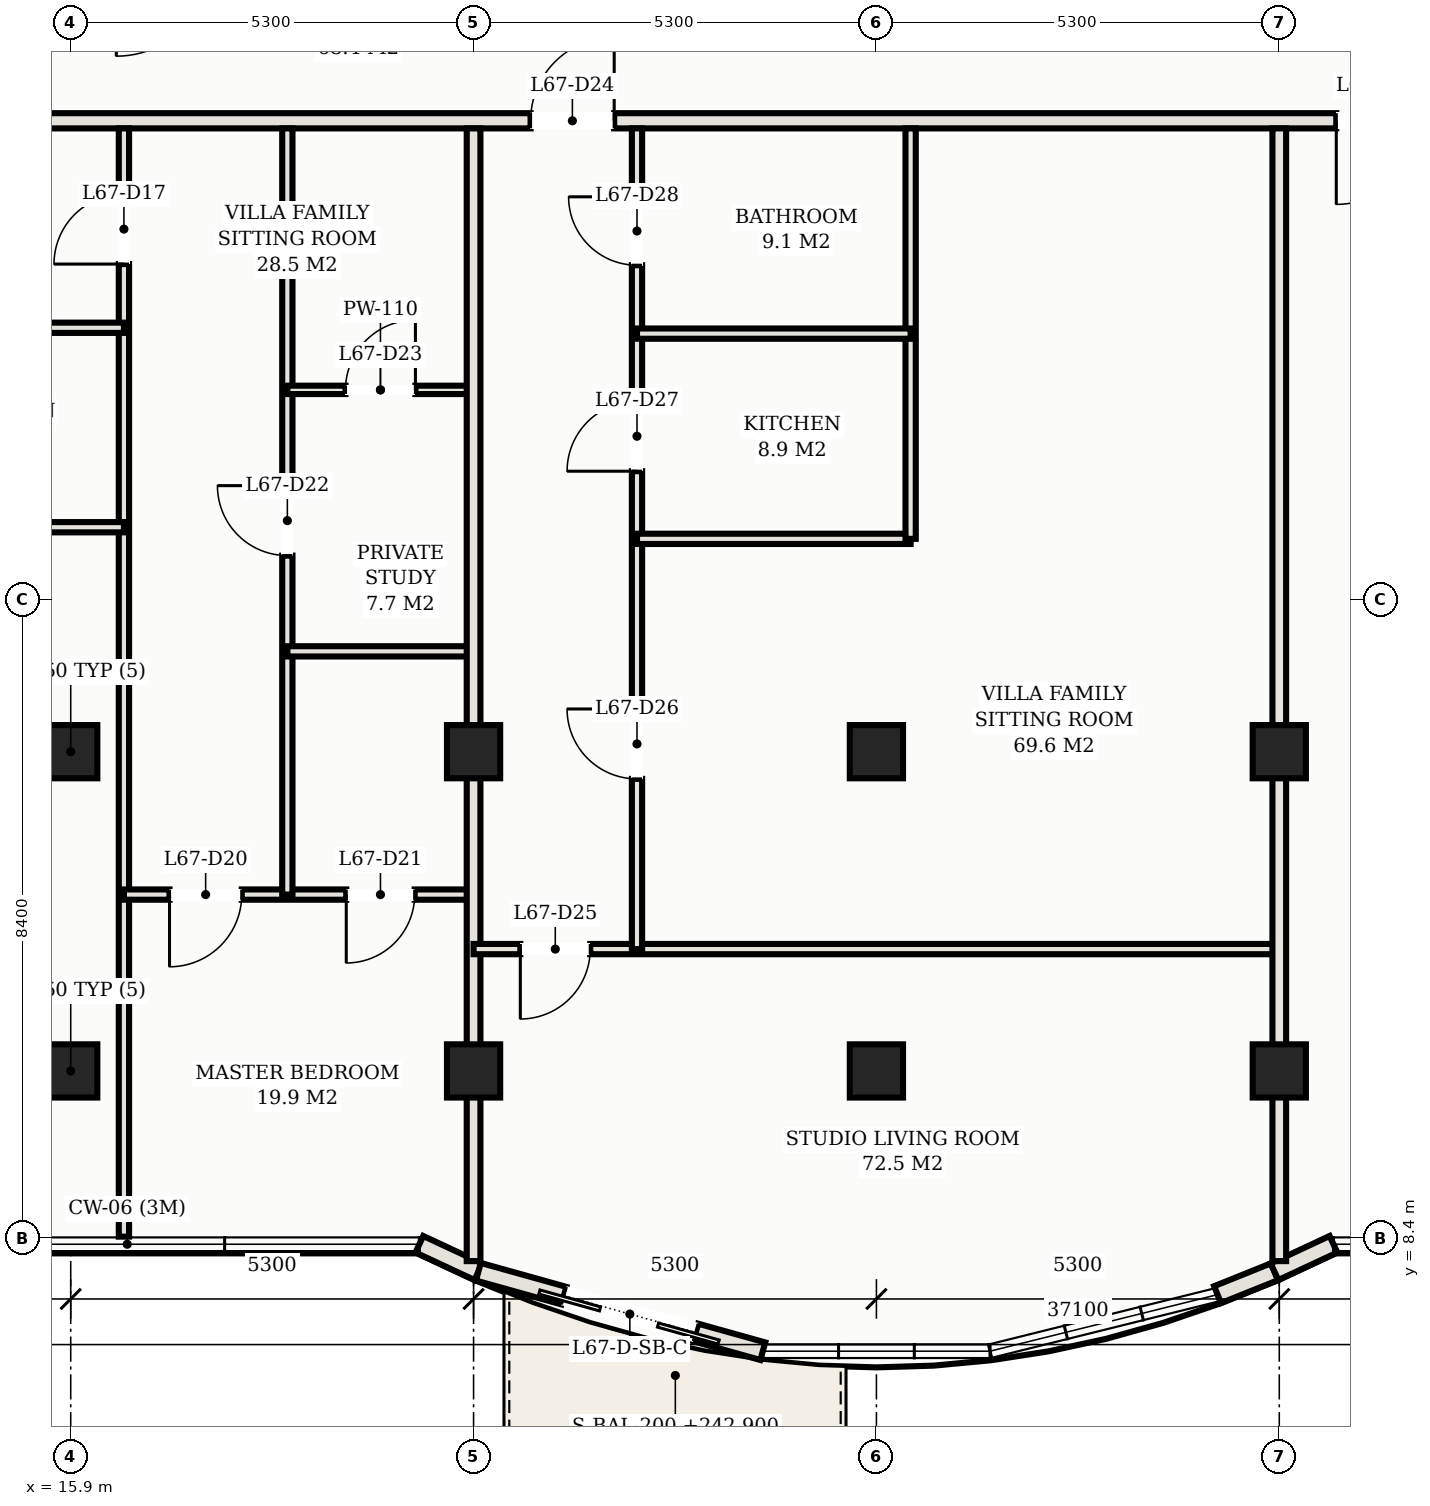
"""IFC4 building model, lengths in metres.
Left out: names, types, materials, properties, quantities, classifications, styles, units other than length and angle.
Written with IfcOpenShell. Run it as: python <this file> out.ifc"""

import sys

from ifc_helpers import new_model, si_unit, direction, frame, frame_2d, origin, origin_2d, place, context, subcontext, project, spatial, rectangle, hollow_rectangle, extrude, element, fill, save


model = new_model("IFC4")
c1 = context("Model", 3, precision=1e-05, world=origin(), true_north=direction((0.0, 1.0)))
c2 = subcontext(c1, "Body", "Model", "MODEL_VIEW")
j1 = project(units=[si_unit("LENGTHUNIT", "METRE"), si_unit("PLANEANGLEUNIT", "RADIAN")], contexts=[c1])
p1 = place(None, origin())
s1 = spatial("IfcSite", under=j1, at=p1, CompositionType="ELEMENT")
p2 = place(p1, origin())
s2 = spatial("IfcBuilding", under=s1, at=p2, CompositionType="ELEMENT")
p3 = place(p2, frame((0.0, 0.0, 242.9)))
s3 = spatial("IfcBuildingStorey", under=s2, at=p3, CompositionType="ELEMENT", Elevation=242.9)
for number, where, z_axis, x_axis in (
    (1, (15.9, 14.8, 0.0), (0.0, 0.0, 1.0), (1.0, 0.0, 0.0)),
    (2, (15.9, 10.6, 0.0), (0.0, 0.0, 1.0), (1.0, 0.0, 0.0)),
    (3, (21.2, 14.8, 0.0), (0.0, 0.0, 1.0), (1.0, 0.0, 0.0)),
    (4, (21.2, 10.6, 0.0), (0.0, 0.0, 1.0), (1.0, 0.0, 0.0)),
    (5, (26.5, 14.8, 0.0), (0.0, 0.0, 1.0), (1.0, 0.0, 0.0)),
    (6, (26.5, 10.6, 0.0), (0.0, 0.0, 1.0), (1.0, 0.0, 0.0)),
    (7, (31.8, 14.8, 0.0), (0.0, 0.0, 1.0), (1.0, 0.0, 0.0)),
    (8, (31.8, 10.6, 0.0), (0.0, 0.0, 1.0), (1.0, 0.0, 0.0)),
):
    element("IfcColumn", number, at=place(p3, frame(where, z_axis=z_axis, x_axis=x_axis)), inside=s3, PredefinedType="COLUMN", context=c2, shape_type="SweptSolid", body=[
        extrude(hollow_rectangle(XDim=0.7, YDim=0.7, WallThickness=0.025, at=origin_2d()), origin(), (0.0, 0.0, 1.0), 3.3),
    ])
p4 = place(p3, frame((20.487, 8.32, 0.0), z_axis=(0.0, 0.0, 1.0), x_axis=(0.906190424584, -0.422869855147, 0.0)))
e9 = element("IfcWall", 9, at=p4, inside=s3, PredefinedType="SOLIDWALL", context=c2, shape_type="SweptSolid", body=[
    extrude(rectangle(XDim=0.856, YDim=0.24, at=frame_2d((0.428, 0.0))), origin(), (0.0, 0.0, 1.0), 3.11),
])
p5 = place(p3, frame((21.263, 7.958, 0.0), z_axis=(0.0, 0.0, 1.0), x_axis=(0.963152398068, -0.268956238255, 0.0)))
e10 = element("IfcWall", 10, at=p5, inside=s3, PredefinedType="SOLIDWALL", context=c2, shape_type="SweptSolid", body=[
    extrude(rectangle(XDim=3.885, YDim=0.24, at=frame_2d((1.942, 0.0))), origin(), (0.0, 0.0, 1.0), 3.11),
])
p6 = place(p5, frame((1.169, 0.0, 0.0)))
e11 = element("IfcOpeningElement", 11, at=p6, cuts=e10, PredefinedType="OPENING", context=c2, shape_type="SweptSolid", body=[
    extrude(rectangle(XDim=1.8, YDim=2.2, at=frame_2d((0.9, 1.1))), frame((0.0, 0.13, 0.0), z_axis=(0.0, -1.0, 0.0), x_axis=(1.0, 0.0, 0.0)), (0.0, 0.0, 1.0), 0.26),
])
p7 = place(p3, frame((30.988, 7.657, 0.0), z_axis=(0.0, 0.0, 1.0), x_axis=(0.927870589467, 0.372902358805, 0.0)))
e12 = element("IfcWall", 12, at=p7, inside=s3, PredefinedType="SOLIDWALL", context=c2, shape_type="SweptSolid", body=[
    extrude(rectangle(XDim=0.807, YDim=0.24, at=frame_2d((0.404, 0.0))), origin(), (0.0, 0.0, 1.0), 3.11),
])
p8 = place(p3, frame((31.737, 7.958, 0.0), z_axis=(0.0, 0.0, 1.0), x_axis=(0.906190424584, 0.422869855147, 0.0)))
e13 = element("IfcWall", 13, at=p8, inside=s3, PredefinedType="SOLIDWALL", context=c2, shape_type="SweptSolid", body=[
    extrude(rectangle(XDim=0.856, YDim=0.24, at=frame_2d((0.428, 0.0))), origin(), (0.0, 0.0, 1.0), 3.11),
])
p9 = place(p3, frame((8.6, 23.1, 0.0), z_axis=(0.0, 0.0, 1.0), x_axis=(1.0, 0.0, 0.0)))
e14 = element("IfcWall", 14, at=p9, inside=s3, PredefinedType="PARTITIONING", context=c2, shape_type="SweptSolid", body=[
    extrude(rectangle(XDim=35.8, YDim=0.2, at=frame_2d((17.9, 0.0))), origin(), (0.0, 0.0, 1.0), 2.45),
])
p10 = place(p9, frame((2.75, 0.0, 0.0)))
e15 = element("IfcOpeningElement", 15, at=p10, cuts=e14, PredefinedType="OPENING", context=c2, shape_type="SweptSolid", body=[
    extrude(rectangle(XDim=1.1, YDim=2.25, at=frame_2d((0.55, 1.125))), frame((0.0, 0.11, 0.0), z_axis=(0.0, -1.0, 0.0), x_axis=(1.0, 0.0, 0.0)), (0.0, 0.0, 1.0), 0.22),
])
p11 = place(p9, frame((13.35, 0.0, 0.0)))
e16 = element("IfcOpeningElement", 16, at=p11, cuts=e14, PredefinedType="OPENING", context=c2, shape_type="SweptSolid", body=[
    extrude(rectangle(XDim=1.1, YDim=2.25, at=frame_2d((0.55, 1.125))), frame((0.0, 0.11, 0.0), z_axis=(0.0, -1.0, 0.0), x_axis=(1.0, 0.0, 0.0)), (0.0, 0.0, 1.0), 0.22),
])
p12 = place(p9, frame((23.95, 0.0, 0.0)))
e17 = element("IfcOpeningElement", 17, at=p12, cuts=e14, PredefinedType="OPENING", context=c2, shape_type="SweptSolid", body=[
    extrude(rectangle(XDim=1.1, YDim=2.25, at=frame_2d((0.55, 1.125))), frame((0.0, 0.11, 0.0), z_axis=(0.0, -1.0, 0.0), x_axis=(1.0, 0.0, 0.0)), (0.0, 0.0, 1.0), 0.22),
])
p13 = place(p9, frame((29.25, 0.0, 0.0)))
e18 = element("IfcOpeningElement", 18, at=p13, cuts=e14, PredefinedType="OPENING", context=c2, shape_type="SweptSolid", body=[
    extrude(rectangle(XDim=1.1, YDim=2.25, at=frame_2d((0.55, 1.125))), frame((0.0, 0.11, 0.0), z_axis=(0.0, -1.0, 0.0), x_axis=(1.0, 0.0, 0.0)), (0.0, 0.0, 1.0), 0.22),
])
p14 = place(p9, frame((0.505, 0.0, 0.0)))
e19 = element("IfcOpeningElement", 19, at=p14, cuts=e14, PredefinedType="OPENING", context=c2, shape_type="SweptSolid", body=[
    extrude(rectangle(XDim=0.9, YDim=2.15, at=frame_2d((0.45, 1.075))), frame((0.0, 0.11, 0.0), z_axis=(0.0, -1.0, 0.0), x_axis=(1.0, 0.0, 0.0)), (0.0, 0.0, 1.0), 0.22),
])
p15 = place(p9, frame((34.395, 0.0, 0.0)))
e20 = element("IfcOpeningElement", 20, at=p15, cuts=e14, PredefinedType="OPENING", context=c2, shape_type="SweptSolid", body=[
    extrude(rectangle(XDim=0.9, YDim=2.15, at=frame_2d((0.45, 1.075))), frame((0.0, 0.11, 0.0), z_axis=(0.0, -1.0, 0.0), x_axis=(1.0, 0.0, 0.0)), (0.0, 0.0, 1.0), 0.22),
])
p16 = place(p3, frame((16.6, 8.42, 0.0), z_axis=(0.0, 0.0, 1.0), x_axis=(0.0, 1.0, 0.0)))
e21 = element("IfcWall", 21, at=p16, inside=s3, PredefinedType="PARTITIONING", context=c2, shape_type="SweptSolid", body=[
    extrude(rectangle(XDim=14.58, YDim=0.135, at=frame_2d((7.29, 0.0))), origin(), (0.0, 0.0, 1.0), 2.45),
])
p17 = place(p16, frame((12.795, 0.0, 0.0)))
e22 = element("IfcOpeningElement", 22, at=p17, cuts=e21, PredefinedType="OPENING", context=c2, shape_type="SweptSolid", body=[
    extrude(rectangle(XDim=0.92, YDim=2.15, at=frame_2d((0.46, 1.075))), frame((0.0, 0.078, 0.0), z_axis=(0.0, -1.0, 0.0), x_axis=(1.0, 0.0, 0.0)), (0.0, 0.0, 1.0), 0.155),
])
for number, where, z_axis, x_axis in (
    (23, (12.75, 17.753, 0.0), (0.0, 0.0, 1.0), (1.0, 0.0, 0.0)),
    (24, (12.75, 20.377, 0.0), (0.0, 0.0, 1.0), (1.0, 0.0, 0.0)),
):
    element("IfcWall", number, at=place(p3, frame(where, z_axis=z_axis, x_axis=x_axis)), inside=s3, PredefinedType="PARTITIONING", context=c2, shape_type="SweptSolid", body=[
        extrude(rectangle(XDim=3.85, YDim=0.135, at=frame_2d((1.925, 0.0))), origin(), (0.0, 0.0, 1.0), 2.45),
    ])
p18 = place(p3, frame((16.6, 12.92, 0.0), z_axis=(0.0, 0.0, 1.0), x_axis=(1.0, 0.0, 0.0)))
e25 = element("IfcWall", 25, at=p18, inside=s3, PredefinedType="PARTITIONING", context=c2, shape_type="SweptSolid", body=[
    extrude(rectangle(XDim=4.6, YDim=0.135, at=frame_2d((2.3, 0.0))), origin(), (0.0, 0.0, 1.0), 2.45),
])
p19 = place(p18, frame((0.6, 0.0, 0.0)))
e26 = element("IfcOpeningElement", 26, at=p19, cuts=e25, PredefinedType="OPENING", context=c2, shape_type="SweptSolid", body=[
    extrude(rectangle(XDim=0.95, YDim=2.15, at=frame_2d((0.475, 1.075))), frame((0.0, 0.078, 0.0), z_axis=(0.0, -1.0, 0.0), x_axis=(1.0, 0.0, 0.0)), (0.0, 0.0, 1.0), 0.155),
])
p20 = place(p18, frame((2.925, 0.0, 0.0)))
e27 = element("IfcOpeningElement", 27, at=p20, cuts=e25, PredefinedType="OPENING", context=c2, shape_type="SweptSolid", body=[
    extrude(rectangle(XDim=0.9, YDim=2.15, at=frame_2d((0.45, 1.075))), frame((0.0, 0.078, 0.0), z_axis=(0.0, -1.0, 0.0), x_axis=(1.0, 0.0, 0.0)), (0.0, 0.0, 1.0), 0.155),
])
p21 = place(p3, frame((18.75, 12.92, 0.0), z_axis=(0.0, 0.0, 1.0), x_axis=(0.0, 1.0, 0.0)))
e28 = element("IfcWall", 28, at=p21, inside=s3, PredefinedType="PARTITIONING", context=c2, shape_type="SweptSolid", body=[
    extrude(rectangle(XDim=10.08, YDim=0.135, at=frame_2d((5.04, 0.0))), origin(), (0.0, 0.0, 1.0), 2.45),
])
p22 = place(p21, frame((4.46, 0.0, 0.0)))
e29 = element("IfcOpeningElement", 29, at=p22, cuts=e28, PredefinedType="OPENING", context=c2, shape_type="SweptSolid", body=[
    extrude(rectangle(XDim=0.92, YDim=2.15, at=frame_2d((0.46, 1.075))), frame((0.0, 0.078, 0.0), z_axis=(0.0, -1.0, 0.0), x_axis=(1.0, 0.0, 0.0)), (0.0, 0.0, 1.0), 0.155),
])
p23 = place(p3, frame((18.75, 16.12, 0.0), z_axis=(0.0, 0.0, 1.0), x_axis=(1.0, 0.0, 0.0)))
e30 = element("IfcWall", 30, at=p23, inside=s3, PredefinedType="PARTITIONING", context=c2, shape_type="SweptSolid", body=[
    extrude(rectangle(XDim=2.45, YDim=0.135, at=frame_2d((1.225, 0.0))), origin(), (0.0, 0.0, 1.0), 2.45),
])
p24 = place(p3, frame((18.75, 19.56, 0.0), z_axis=(0.0, 0.0, 1.0), x_axis=(1.0, 0.0, 0.0)))
e31 = element("IfcWall", 31, at=p24, inside=s3, PredefinedType="MOVABLE", context=c2, shape_type="SweptSolid", body=[
    extrude(rectangle(XDim=2.45, YDim=0.11, at=frame_2d((1.225, 0.0))), origin(), (0.0, 0.0, 1.0), 2.45),
])
p25 = place(p24, frame((0.765, 0.0, 0.0)))
e32 = element("IfcOpeningElement", 32, at=p25, cuts=e31, PredefinedType="OPENING", context=c2, shape_type="SweptSolid", body=[
    extrude(rectangle(XDim=0.92, YDim=2.15, at=frame_2d((0.46, 1.075))), frame((0.0, 0.065, 0.0), z_axis=(0.0, -1.0, 0.0), x_axis=(1.0, 0.0, 0.0)), (0.0, 0.0, 1.0), 0.13),
])
p26 = place(p3, frame((21.2, 8.098, 0.0), z_axis=(0.0, 0.0, 1.0), x_axis=(0.0, 1.0, 0.0)))
e33 = element("IfcWall", 33, at=p26, inside=s3, PredefinedType="PARTITIONING", context=c2, shape_type="SweptSolid", body=[
    extrude(rectangle(XDim=14.902, YDim=0.18, at=frame_2d((7.451, 0.0))), origin(), (0.0, 0.0, 1.0), 2.45),
])
p27 = place(p3, frame((21.2, 12.203, 0.0), z_axis=(0.0, 0.0, 1.0), x_axis=(1.0, 0.0, 0.0)))
e34 = element("IfcWall", 34, at=p27, inside=s3, PredefinedType="PARTITIONING", context=c2, shape_type="SweptSolid", body=[
    extrude(rectangle(XDim=10.6, YDim=0.135, at=frame_2d((5.3, 0.0))), origin(), (0.0, 0.0, 1.0), 2.45),
])
p28 = place(p27, frame((0.615, 0.0, 0.0)))
e35 = element("IfcOpeningElement", 35, at=p28, cuts=e34, PredefinedType="OPENING", context=c2, shape_type="SweptSolid", body=[
    extrude(rectangle(XDim=0.92, YDim=2.15, at=frame_2d((0.46, 1.075))), frame((0.0, 0.078, 0.0), z_axis=(0.0, -1.0, 0.0), x_axis=(1.0, 0.0, 0.0)), (0.0, 0.0, 1.0), 0.155),
])
p29 = place(p3, frame((23.35, 12.203, 0.0), z_axis=(0.0, 0.0, 1.0), x_axis=(0.0, 1.0, 0.0)))
e36 = element("IfcWall", 36, at=p29, inside=s3, PredefinedType="PARTITIONING", context=c2, shape_type="SweptSolid", body=[
    extrude(rectangle(XDim=10.797, YDim=0.135, at=frame_2d((5.398, 0.0))), origin(), (0.0, 0.0, 1.0), 2.45),
])
p30 = place(p29, frame((2.239, 0.0, 0.0)))
e37 = element("IfcOpeningElement", 37, at=p30, cuts=e36, PredefinedType="OPENING", context=c2, shape_type="SweptSolid", body=[
    extrude(rectangle(XDim=0.92, YDim=2.15, at=frame_2d((0.46, 1.075))), frame((0.0, 0.078, 0.0), z_axis=(0.0, -1.0, 0.0), x_axis=(1.0, 0.0, 0.0)), (0.0, 0.0, 1.0), 0.155),
])
p31 = place(p29, frame((6.287, 0.0, 0.0)))
e38 = element("IfcOpeningElement", 38, at=p31, cuts=e36, PredefinedType="OPENING", context=c2, shape_type="SweptSolid", body=[
    extrude(rectangle(XDim=0.92, YDim=2.15, at=frame_2d((0.46, 1.075))), frame((0.0, 0.078, 0.0), z_axis=(0.0, -1.0, 0.0), x_axis=(1.0, 0.0, 0.0)), (0.0, 0.0, 1.0), 0.155),
])
p32 = place(p29, frame((8.997, 0.0, 0.0)))
e39 = element("IfcOpeningElement", 39, at=p32, cuts=e36, PredefinedType="OPENING", context=c2, shape_type="SweptSolid", body=[
    extrude(rectangle(XDim=0.9, YDim=2.15, at=frame_2d((0.45, 1.075))), frame((0.0, 0.078, 0.0), z_axis=(0.0, -1.0, 0.0), x_axis=(1.0, 0.0, 0.0)), (0.0, 0.0, 1.0), 0.155),
])
p33 = place(p3, frame((23.35, 17.6, 0.0), z_axis=(0.0, 0.0, 1.0), x_axis=(1.0, 0.0, 0.0)))
e40 = element("IfcWall", 40, at=p33, inside=s3, PredefinedType="PARTITIONING", context=c2, shape_type="SweptSolid", body=[
    extrude(rectangle(XDim=3.6, YDim=0.135, at=frame_2d((1.8, 0.0))), origin(), (0.0, 0.0, 1.0), 2.45),
])
p34 = place(p3, frame((26.95, 17.6, 0.0), z_axis=(0.0, 0.0, 1.0), x_axis=(0.0, 1.0, 0.0)))
e41 = element("IfcWall", 41, at=p34, inside=s3, PredefinedType="PARTITIONING", context=c2, shape_type="SweptSolid", body=[
    extrude(rectangle(XDim=5.4, YDim=0.135, at=frame_2d((2.7, 0.0))), origin(), (0.0, 0.0, 1.0), 2.45),
])
p35 = place(p3, frame((23.35, 20.3, 0.0), z_axis=(0.0, 0.0, 1.0), x_axis=(1.0, 0.0, 0.0)))
e42 = element("IfcWall", 42, at=p35, inside=s3, PredefinedType="PARTITIONING", context=c2, shape_type="SweptSolid", body=[
    extrude(rectangle(XDim=3.6, YDim=0.135, at=frame_2d((1.8, 0.0))), origin(), (0.0, 0.0, 1.0), 2.45),
])
p36 = place(p3, frame((31.8, 8.098, 0.0), z_axis=(0.0, 0.0, 1.0), x_axis=(0.0, 1.0, 0.0)))
e43 = element("IfcWall", 43, at=p36, inside=s3, PredefinedType="PARTITIONING", context=c2, shape_type="SweptSolid", body=[
    extrude(rectangle(XDim=14.902, YDim=0.18, at=frame_2d((7.451, 0.0))), origin(), (0.0, 0.0, 1.0), 2.45),
])
p37 = place(p6, frame((1.8, 0.0, 0.0), z_axis=(0.0, 0.0, 1.0), x_axis=(-1.0, 0.0, 0.0)))
e44 = element("IfcDoor", 44, at=p37, inside=s3, OperationType="DOUBLE_DOOR_SLIDING", PredefinedType="DOOR", context=c2, shape_type="SweptSolid", body=[
    extrude(rectangle(XDim=1.8, YDim=2.2, at=frame_2d((0.9, 1.1))), frame((0.0, 0.025, 0.0), z_axis=(0.0, -1.0, 0.0), x_axis=(1.0, 0.0, 0.0)), (0.0, 0.0, 1.0), 0.05),
])
fill(e11, e44)
p38 = place(p17, origin())
e45 = element("IfcDoor", 45, at=p38, inside=s3, OperationType="SINGLE_SWING_LEFT", PredefinedType="DOOR", context=c2, shape_type="SweptSolid", body=[
    extrude(rectangle(XDim=0.92, YDim=2.15, at=frame_2d((0.46, 1.075))), frame((0.0, 0.025, 0.0), z_axis=(0.0, -1.0, 0.0), x_axis=(1.0, 0.0, 0.0)), (0.0, 0.0, 1.0), 0.05),
])
fill(e22, e45)
p39 = place(p19, frame((0.95, 0.0, 0.0), z_axis=(0.0, 0.0, 1.0), x_axis=(-1.0, 0.0, 0.0)))
e46 = element("IfcDoor", 46, at=p39, inside=s3, OperationType="SINGLE_SWING_RIGHT", PredefinedType="DOOR", context=c2, shape_type="SweptSolid", body=[
    extrude(rectangle(XDim=0.95, YDim=2.15, at=frame_2d((0.475, 1.075))), frame((0.0, 0.025, 0.0), z_axis=(0.0, -1.0, 0.0), x_axis=(1.0, 0.0, 0.0)), (0.0, 0.0, 1.0), 0.05),
])
fill(e26, e46)
p40 = place(p20, frame((0.9, 0.0, 0.0), z_axis=(0.0, 0.0, 1.0), x_axis=(-1.0, 0.0, 0.0)))
e47 = element("IfcDoor", 47, at=p40, inside=s3, OperationType="SINGLE_SWING_RIGHT", PredefinedType="DOOR", context=c2, shape_type="SweptSolid", body=[
    extrude(rectangle(XDim=0.9, YDim=2.15, at=frame_2d((0.45, 1.075))), frame((0.0, 0.025, 0.0), z_axis=(0.0, -1.0, 0.0), x_axis=(1.0, 0.0, 0.0)), (0.0, 0.0, 1.0), 0.05),
])
fill(e27, e47)
p41 = place(p22, origin())
e48 = element("IfcDoor", 48, at=p41, inside=s3, OperationType="SINGLE_SWING_RIGHT", PredefinedType="DOOR", context=c2, shape_type="SweptSolid", body=[
    extrude(rectangle(XDim=0.92, YDim=2.15, at=frame_2d((0.46, 1.075))), frame((0.0, 0.025, 0.0), z_axis=(0.0, -1.0, 0.0), x_axis=(1.0, 0.0, 0.0)), (0.0, 0.0, 1.0), 0.05),
])
fill(e29, e48)
p42 = place(p25, origin())
e49 = element("IfcDoor", 49, at=p42, inside=s3, OperationType="SINGLE_SWING_RIGHT", PredefinedType="DOOR", context=c2, shape_type="SweptSolid", body=[
    extrude(rectangle(XDim=0.92, YDim=2.15, at=frame_2d((0.46, 1.075))), frame((0.0, 0.025, 0.0), z_axis=(0.0, -1.0, 0.0), x_axis=(1.0, 0.0, 0.0)), (0.0, 0.0, 1.0), 0.05),
])
fill(e32, e49)
p43 = place(p11, origin())
e50 = element("IfcDoor", 50, at=p43, inside=s3, OperationType="SINGLE_SWING_RIGHT", PredefinedType="DOOR", context=c2, shape_type="SweptSolid", body=[
    extrude(rectangle(XDim=1.1, YDim=2.25, at=frame_2d((0.55, 1.125))), frame((0.0, 0.025, 0.0), z_axis=(0.0, -1.0, 0.0), x_axis=(1.0, 0.0, 0.0)), (0.0, 0.0, 1.0), 0.05),
])
fill(e16, e50)
p44 = place(p28, frame((0.92, 0.0, 0.0), z_axis=(0.0, 0.0, 1.0), x_axis=(-1.0, 0.0, 0.0)))
e51 = element("IfcDoor", 51, at=p44, inside=s3, OperationType="SINGLE_SWING_RIGHT", PredefinedType="DOOR", context=c2, shape_type="SweptSolid", body=[
    extrude(rectangle(XDim=0.92, YDim=2.15, at=frame_2d((0.46, 1.075))), frame((0.0, 0.025, 0.0), z_axis=(0.0, -1.0, 0.0), x_axis=(1.0, 0.0, 0.0)), (0.0, 0.0, 1.0), 0.05),
])
fill(e35, e51)
p45 = place(p30, origin())
e52 = element("IfcDoor", 52, at=p45, inside=s3, OperationType="SINGLE_SWING_RIGHT", PredefinedType="DOOR", context=c2, shape_type="SweptSolid", body=[
    extrude(rectangle(XDim=0.92, YDim=2.15, at=frame_2d((0.46, 1.075))), frame((0.0, 0.025, 0.0), z_axis=(0.0, -1.0, 0.0), x_axis=(1.0, 0.0, 0.0)), (0.0, 0.0, 1.0), 0.05),
])
fill(e37, e52)
p46 = place(p31, origin())
e53 = element("IfcDoor", 53, at=p46, inside=s3, OperationType="SINGLE_SWING_LEFT", PredefinedType="DOOR", context=c2, shape_type="SweptSolid", body=[
    extrude(rectangle(XDim=0.92, YDim=2.15, at=frame_2d((0.46, 1.075))), frame((0.0, 0.025, 0.0), z_axis=(0.0, -1.0, 0.0), x_axis=(1.0, 0.0, 0.0)), (0.0, 0.0, 1.0), 0.05),
])
fill(e38, e53)
p47 = place(p32, origin())
e54 = element("IfcDoor", 54, at=p47, inside=s3, OperationType="SINGLE_SWING_RIGHT", PredefinedType="DOOR", context=c2, shape_type="SweptSolid", body=[
    extrude(rectangle(XDim=0.9, YDim=2.15, at=frame_2d((0.45, 1.075))), frame((0.0, 0.025, 0.0), z_axis=(0.0, -1.0, 0.0), x_axis=(1.0, 0.0, 0.0)), (0.0, 0.0, 1.0), 0.05),
])
fill(e39, e54)
p48 = place(p12, frame((1.1, 0.0, 0.0), z_axis=(0.0, 0.0, 1.0), x_axis=(-1.0, 0.0, 0.0)))
e55 = element("IfcDoor", 55, at=p48, inside=s3, OperationType="SINGLE_SWING_RIGHT", PredefinedType="DOOR", context=c2, shape_type="SweptSolid", body=[
    extrude(rectangle(XDim=1.1, YDim=2.25, at=frame_2d((0.55, 1.125))), frame((0.0, 0.025, 0.0), z_axis=(0.0, -1.0, 0.0), x_axis=(1.0, 0.0, 0.0)), (0.0, 0.0, 1.0), 0.05),
])
fill(e17, e55)
save(model, sys.argv[1])
